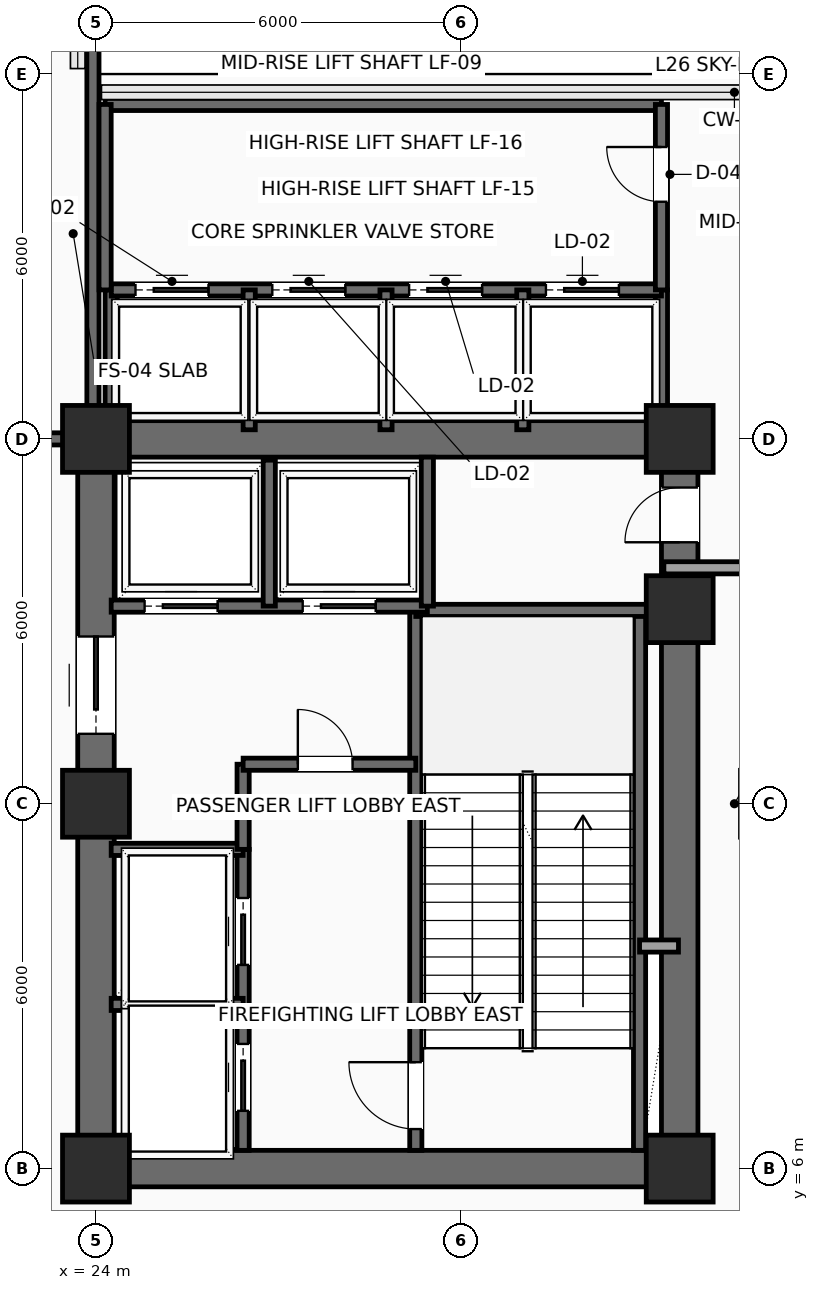
"""IFC4 building model, lengths in metres.
Left out: names, types, materials, properties, quantities, classifications, styles, units other than length and angle.
Written with IfcOpenShell. Run it as: python <this file> out.ifc"""

import sys

from ifc_helpers import new_model, si_unit, direction, frame, frame_2d, origin, origin_2d, place, context, subcontext, project, spatial, rectangle, extrude, element, fill, save


model = new_model("IFC4")
c1 = context("Model", 3, precision=1e-05, world=origin(), true_north=direction((0.0, 1.0)))
c2 = subcontext(c1, "Body", "Model", "MODEL_VIEW")
j1 = project(units=[si_unit("LENGTHUNIT", "METRE"), si_unit("PLANEANGLEUNIT", "RADIAN")], contexts=[c1])
p1 = place(None, origin())
s1 = spatial("IfcSite", under=j1, at=p1, CompositionType="ELEMENT")
p2 = place(p1, origin())
s2 = spatial("IfcBuilding", under=s1, at=p2, CompositionType="ELEMENT")
p3 = place(p2, frame((0.0, 0.0, 110.85)))
s3 = spatial("IfcBuildingStorey", under=s2, at=p3, CompositionType="ELEMENT", Elevation=110.85)
for number, where, z_axis, x_axis in (
    (1, (24.0, 6.0, 0.0), (0.0, 0.0, 1.0), (1.0, 0.0, 0.0)),
    (2, (24.0, 12.0, 0.0), (0.0, 0.0, 1.0), (1.0, 0.0, 0.0)),
    (3, (24.0, 18.0, 0.0), (0.0, 0.0, 1.0), (1.0, 0.0, 0.0)),
    (4, (33.6, 6.0, 0.0), (0.0, 0.0, 1.0), (1.0, 0.0, 0.0)),
    (5, (33.6, 15.2, 0.0), (0.0, 0.0, 1.0), (1.0, 0.0, 0.0)),
    (6, (33.6, 18.0, 0.0), (0.0, 0.0, 1.0), (1.0, 0.0, 0.0)),
):
    element("IfcColumn", number, at=place(p3, frame(where, z_axis=z_axis, x_axis=x_axis)), inside=s3, PredefinedType="COLUMN", context=c2, shape_type="SweptSolid", body=[
        extrude(rectangle(XDim=1.1, YDim=1.1, at=origin_2d()), origin(), (0.0, 0.0, 1.0), 4.8),
    ])
for number, where, z_axis, x_axis in (
    (7, (24.0, 6.0, 0.0), (0.0, 0.0, 1.0), (1.0, 0.0, 0.0)),
    (8, (24.0, 18.0, 0.0), (0.0, 0.0, 1.0), (1.0, 0.0, 0.0)),
):
    element("IfcWall", number, at=place(p3, frame(where, z_axis=z_axis, x_axis=x_axis)), inside=s3, PredefinedType="SHEAR", context=c2, shape_type="SweptSolid", body=[
        extrude(rectangle(XDim=9.6, YDim=0.6, at=frame_2d((4.8, 0.0))), origin(), (0.0, 0.0, 1.0), 4.575),
    ])
p4 = place(p3, frame((24.0, 6.0, 0.0), z_axis=(0.0, 0.0, 1.0), x_axis=(0.0, 1.0, 0.0)))
e9 = element("IfcWall", 9, at=p4, inside=s3, PredefinedType="SHEAR", context=c2, shape_type="SweptSolid", body=[
    extrude(rectangle(XDim=12.0, YDim=0.6, at=frame_2d((6.0, 0.0))), origin(), (0.0, 0.0, 1.0), 4.575),
])
p5 = place(p4, frame((7.15, 0.0, 0.0)))
e10 = element("IfcOpeningElement", 10, at=p5, cuts=e9, PredefinedType="OPENING", context=c2, shape_type="SweptSolid", body=[
    extrude(rectangle(XDim=1.6, YDim=2.3, at=frame_2d((0.8, 1.15))), frame((0.0, 0.31, 0.0), z_axis=(0.0, -1.0, 0.0), x_axis=(1.0, 0.0, 0.0)), (0.0, 0.0, 1.0), 0.62),
])
p6 = place(p3, frame((33.6, 6.0, 0.0), z_axis=(0.0, 0.0, 1.0), x_axis=(0.0, 1.0, 0.0)))
e11 = element("IfcWall", 11, at=p6, inside=s3, PredefinedType="SHEAR", context=c2, shape_type="SweptSolid", body=[
    extrude(rectangle(XDim=12.0, YDim=0.6, at=frame_2d((6.0, 0.0))), origin(), (0.0, 0.0, 1.0), 4.575),
])
p7 = place(p6, frame((10.3, 0.0, 0.0)))
e12 = element("IfcOpeningElement", 12, at=p7, cuts=e11, PredefinedType="OPENING", context=c2, shape_type="SweptSolid", body=[
    extrude(rectangle(XDim=0.9, YDim=2.15, at=frame_2d((0.45, 1.075))), frame((0.0, 0.31, 0.0), z_axis=(0.0, -1.0, 0.0), x_axis=(1.0, 0.0, 0.0)), (0.0, 0.0, 1.0), 0.62),
])
p8 = place(p3, frame((29.26, 6.3, 0.0), z_axis=(0.0, 0.0, 1.0), x_axis=(0.0, 1.0, 0.0)))
e13 = element("IfcWall", 13, at=p8, inside=s3, PredefinedType="SHEAR", context=c2, shape_type="SweptSolid", body=[
    extrude(rectangle(XDim=8.88, YDim=0.2, at=frame_2d((4.44, 0.0))), origin(), (0.0, 0.0, 1.0), 4.575),
])
p9 = place(p8, frame((0.35, 0.0, 0.0)))
e14 = element("IfcOpeningElement", 14, at=p9, cuts=e13, PredefinedType="OPENING", context=c2, shape_type="SweptSolid", body=[
    extrude(rectangle(XDim=1.1, YDim=2.2, at=frame_2d((0.55, 1.1))), frame((0.0, 0.11, 0.0), z_axis=(0.0, -1.0, 0.0), x_axis=(1.0, 0.0, 0.0)), (0.0, 0.0, 1.0), 0.22),
])
p10 = place(p3, frame((32.94, 6.3, 0.0), z_axis=(0.0, 0.0, 1.0), x_axis=(0.0, 1.0, 0.0)))
e15 = element("IfcWall", 15, at=p10, inside=s3, PredefinedType="SHEAR", context=c2, shape_type="SweptSolid", body=[
    extrude(rectangle(XDim=8.88, YDim=0.2, at=frame_2d((4.44, 0.0))), origin(), (0.0, 0.0, 1.0), 4.575),
])
p11 = place(p3, frame((29.26, 15.18, 0.0), z_axis=(0.0, 0.0, 1.0), x_axis=(1.0, 0.0, 0.0)))
e16 = element("IfcWall", 16, at=p11, inside=s3, PredefinedType="SHEAR", context=c2, shape_type="SweptSolid", body=[
    extrude(rectangle(XDim=4.04, YDim=0.2, at=frame_2d((2.02, 0.0))), origin(), (0.0, 0.0, 1.0), 4.575),
])
p12 = place(p3, frame((26.42, 6.3, 0.0), z_axis=(0.0, 0.0, 1.0), x_axis=(0.0, 1.0, 0.0)))
e17 = element("IfcWall", 17, at=p12, inside=s3, PredefinedType="SHEAR", context=c2, shape_type="SweptSolid", body=[
    extrude(rectangle(XDim=4.95, YDim=0.2, at=frame_2d((2.475, 0.0))), origin(), (0.0, 0.0, 1.0), 4.575),
])
p13 = place(p12, frame((0.65, 0.0, 0.0)))
e18 = element("IfcOpeningElement", 18, at=p13, cuts=e17, PredefinedType="OPENING", context=c2, shape_type="SweptSolid", body=[
    extrude(rectangle(XDim=1.1, YDim=2.2, at=frame_2d((0.55, 1.1))), frame((0.0, 0.11, 0.0), z_axis=(0.0, -1.0, 0.0), x_axis=(1.0, 0.0, 0.0)), (0.0, 0.0, 1.0), 0.22),
])
p14 = place(p12, frame((3.05, 0.0, 0.0)))
e19 = element("IfcOpeningElement", 19, at=p14, cuts=e17, PredefinedType="OPENING", context=c2, shape_type="SweptSolid", body=[
    extrude(rectangle(XDim=1.1, YDim=2.2, at=frame_2d((0.55, 1.1))), frame((0.0, 0.11, 0.0), z_axis=(0.0, -1.0, 0.0), x_axis=(1.0, 0.0, 0.0)), (0.0, 0.0, 1.0), 0.22),
])
for number, where, z_axis, x_axis in (
    (20, (24.25, 8.7, 0.0), (0.0, 0.0, 1.0), (1.0, 0.0, 0.0)),
    (21, (24.25, 11.25, 0.0), (0.0, 0.0, 1.0), (1.0, 0.0, 0.0)),
):
    element("IfcWall", number, at=place(p3, frame(where, z_axis=z_axis, x_axis=x_axis)), inside=s3, PredefinedType="SHEAR", context=c2, shape_type="SweptSolid", body=[
        extrude(rectangle(XDim=2.17, YDim=0.2, at=frame_2d((1.085, 0.0))), origin(), (0.0, 0.0, 1.0), 4.575),
    ])
p15 = place(p3, frame((26.42, 11.25, 0.0), z_axis=(0.0, 0.0, 1.0), x_axis=(0.0, 1.0, 0.0)))
e22 = element("IfcWall", 22, at=p15, inside=s3, PredefinedType="SHEAR", context=c2, shape_type="SweptSolid", body=[
    extrude(rectangle(XDim=1.4, YDim=0.2, at=frame_2d((0.7, 0.0))), origin(), (0.0, 0.0, 1.0), 4.575),
])
p16 = place(p3, frame((26.42, 12.65, 0.0), z_axis=(0.0, 0.0, 1.0), x_axis=(1.0, 0.0, 0.0)))
e23 = element("IfcWall", 23, at=p16, inside=s3, PredefinedType="SHEAR", context=c2, shape_type="SweptSolid", body=[
    extrude(rectangle(XDim=2.84, YDim=0.2, at=frame_2d((1.42, 0.0))), origin(), (0.0, 0.0, 1.0), 4.575),
])
p17 = place(p16, frame((0.9, 0.0, 0.0)))
e24 = element("IfcOpeningElement", 24, at=p17, cuts=e23, PredefinedType="OPENING", context=c2, shape_type="SweptSolid", body=[
    extrude(rectangle(XDim=0.9, YDim=2.15, at=frame_2d((0.45, 1.075))), frame((0.0, 0.11, 0.0), z_axis=(0.0, -1.0, 0.0), x_axis=(1.0, 0.0, 0.0)), (0.0, 0.0, 1.0), 0.22),
])
p18 = place(p3, frame((32.94, 9.66, 0.0), z_axis=(0.0, 0.0, 1.0), x_axis=(1.0, 0.0, 0.0)))
e25 = element("IfcWall", 25, at=p18, inside=s3, PredefinedType="SOLIDWALL", context=c2, shape_type="SweptSolid", body=[
    extrude(rectangle(XDim=0.64, YDim=0.2, at=frame_2d((0.32, 0.0))), origin(), (0.0, 0.0, 1.0), 4.575),
])
p19 = place(p3, frame((24.25, 15.25, 0.0), z_axis=(0.0, 0.0, 1.0), x_axis=(1.0, 0.0, 0.0)))
e26 = element("IfcWall", 26, at=p19, inside=s3, PredefinedType="SHEAR", context=c2, shape_type="SweptSolid", body=[
    extrude(rectangle(XDim=5.2, YDim=0.2, at=frame_2d((2.6, 0.0))), origin(), (0.0, 0.0, 1.0), 4.575),
])
p20 = place(p19, frame((0.55, 0.0, 0.0)))
e27 = element("IfcOpeningElement", 27, at=p20, cuts=e26, PredefinedType="OPENING", context=c2, shape_type="SweptSolid", body=[
    extrude(rectangle(XDim=1.2, YDim=2.2, at=frame_2d((0.6, 1.1))), frame((0.0, 0.11, 0.0), z_axis=(0.0, -1.0, 0.0), x_axis=(1.0, 0.0, 0.0)), (0.0, 0.0, 1.0), 0.22),
])
p21 = place(p19, frame((3.15, 0.0, 0.0)))
e28 = element("IfcOpeningElement", 28, at=p21, cuts=e26, PredefinedType="OPENING", context=c2, shape_type="SweptSolid", body=[
    extrude(rectangle(XDim=1.2, YDim=2.2, at=frame_2d((0.6, 1.1))), frame((0.0, 0.11, 0.0), z_axis=(0.0, -1.0, 0.0), x_axis=(1.0, 0.0, 0.0)), (0.0, 0.0, 1.0), 0.22),
])
p22 = place(p3, frame((26.85, 15.25, 0.0), z_axis=(0.0, 0.0, 1.0), x_axis=(0.0, 1.0, 0.0)))
e29 = element("IfcWall", 29, at=p22, inside=s3, PredefinedType="SHEAR", context=c2, shape_type="SweptSolid", body=[
    extrude(rectangle(XDim=2.4, YDim=0.2, at=frame_2d((1.2, 0.0))), origin(), (0.0, 0.0, 1.0), 4.575),
])
p23 = place(p3, frame((29.45, 15.25, 0.0), z_axis=(0.0, 0.0, 1.0), x_axis=(0.0, 1.0, 0.0)))
e30 = element("IfcWall", 30, at=p23, inside=s3, PredefinedType="SHEAR", context=c2, shape_type="SweptSolid", body=[
    extrude(rectangle(XDim=2.45, YDim=0.2, at=frame_2d((1.225, 0.0))), origin(), (0.0, 0.0, 1.0), 4.575),
])
p24 = place(p3, frame((20.45, 18.0, 0.0), z_axis=(0.0, 0.0, 1.0), x_axis=(1.0, 0.0, 0.0)))
e31 = element("IfcWall", 31, at=p24, inside=s3, PredefinedType="SHEAR", context=c2, shape_type="SweptSolid", body=[
    extrude(rectangle(XDim=3.5, YDim=0.2, at=frame_2d((1.75, 0.0))), origin(), (0.0, 0.0, 1.0), 4.575),
])
p25 = place(p24, frame((0.95, 0.0, 0.0)))
e32 = element("IfcOpeningElement", 32, at=p25, cuts=e31, PredefinedType="OPENING", context=c2, shape_type="SweptSolid", body=[
    extrude(rectangle(XDim=1.6, YDim=2.3, at=frame_2d((0.8, 1.15))), frame((0.0, 0.11, 0.0), z_axis=(0.0, -1.0, 0.0), x_axis=(1.0, 0.0, 0.0)), (0.0, 0.0, 1.0), 0.22),
])
p26 = place(p3, frame((23.95, 18.0, 0.0), z_axis=(0.0, 0.0, 1.0), x_axis=(0.0, 1.0, 0.0)))
e33 = element("IfcWall", 33, at=p26, inside=s3, PredefinedType="SHEAR", context=c2, shape_type="SweptSolid", body=[
    extrude(rectangle(XDim=9.3, YDim=0.2, at=frame_2d((4.65, 0.0))), origin(), (0.0, 0.0, 1.0), 4.575),
])
for number, where, z_axis, x_axis in (
    (34, (33.3, 18.1, 0.0), (0.0, 0.0, 1.0), (0.0, 1.0, 0.0)),
    (35, (24.25, 18.1, 0.0), (0.0, 0.0, 1.0), (0.0, 1.0, 0.0)),
):
    element("IfcWall", number, at=place(p3, frame(where, z_axis=z_axis, x_axis=x_axis)), inside=s3, PredefinedType="SHEAR", context=c2, shape_type="SweptSolid", body=[
        extrude(rectangle(XDim=2.35, YDim=0.2, at=frame_2d((1.175, 0.0))), origin(), (0.0, 0.0, 1.0), 4.575),
    ])
p27 = place(p3, frame((24.25, 20.45, 0.0), z_axis=(0.0, 0.0, 1.0), x_axis=(1.0, 0.0, 0.0)))
e36 = element("IfcWall", 36, at=p27, inside=s3, PredefinedType="SHEAR", context=c2, shape_type="SweptSolid", body=[
    extrude(rectangle(XDim=9.05, YDim=0.2, at=frame_2d((4.525, 0.0))), origin(), (0.0, 0.0, 1.0), 4.575),
])
p28 = place(p27, frame((0.4, 0.0, 0.0)))
e37 = element("IfcOpeningElement", 37, at=p28, cuts=e36, PredefinedType="OPENING", context=c2, shape_type="SweptSolid", body=[
    extrude(rectangle(XDim=1.2, YDim=2.2, at=frame_2d((0.6, 1.1))), frame((0.0, 0.11, 0.0), z_axis=(0.0, -1.0, 0.0), x_axis=(1.0, 0.0, 0.0)), (0.0, 0.0, 1.0), 0.22),
])
p29 = place(p27, frame((2.65, 0.0, 0.0)))
e38 = element("IfcOpeningElement", 38, at=p29, cuts=e36, PredefinedType="OPENING", context=c2, shape_type="SweptSolid", body=[
    extrude(rectangle(XDim=1.2, YDim=2.2, at=frame_2d((0.6, 1.1))), frame((0.0, 0.11, 0.0), z_axis=(0.0, -1.0, 0.0), x_axis=(1.0, 0.0, 0.0)), (0.0, 0.0, 1.0), 0.22),
])
p30 = place(p27, frame((4.9, 0.0, 0.0)))
e39 = element("IfcOpeningElement", 39, at=p30, cuts=e36, PredefinedType="OPENING", context=c2, shape_type="SweptSolid", body=[
    extrude(rectangle(XDim=1.2, YDim=2.2, at=frame_2d((0.6, 1.1))), frame((0.0, 0.11, 0.0), z_axis=(0.0, -1.0, 0.0), x_axis=(1.0, 0.0, 0.0)), (0.0, 0.0, 1.0), 0.22),
])
p31 = place(p27, frame((7.15, 0.0, 0.0)))
e40 = element("IfcOpeningElement", 40, at=p31, cuts=e36, PredefinedType="OPENING", context=c2, shape_type="SweptSolid", body=[
    extrude(rectangle(XDim=1.2, YDim=2.2, at=frame_2d((0.6, 1.1))), frame((0.0, 0.11, 0.0), z_axis=(0.0, -1.0, 0.0), x_axis=(1.0, 0.0, 0.0)), (0.0, 0.0, 1.0), 0.22),
])
for number, where, z_axis, x_axis in (
    (41, (26.52, 18.15, 0.0), (0.0, 0.0, 1.0), (0.0, 1.0, 0.0)),
    (42, (28.77, 18.15, 0.0), (0.0, 0.0, 1.0), (0.0, 1.0, 0.0)),
    (43, (31.02, 18.15, 0.0), (0.0, 0.0, 1.0), (0.0, 1.0, 0.0)),
):
    element("IfcWall", number, at=place(p3, frame(where, z_axis=z_axis, x_axis=x_axis)), inside=s3, PredefinedType="SHEAR", context=c2, shape_type="SweptSolid", body=[
        extrude(rectangle(XDim=2.3, YDim=0.2, at=frame_2d((1.15, 0.0))), origin(), (0.0, 0.0, 1.0), 4.575),
    ])
p32 = place(p3, frame((24.15, 23.5, 0.0), z_axis=(0.0, 0.0, 1.0), x_axis=(1.0, 0.0, 0.0)))
e44 = element("IfcWall", 44, at=p32, inside=s3, PredefinedType="SHEAR", context=c2, shape_type="SweptSolid", body=[
    extrude(rectangle(XDim=9.15, YDim=0.2, at=frame_2d((4.575, 0.0))), origin(), (0.0, 0.0, 1.0), 4.575),
])
p33 = place(p3, frame((33.3, 20.45, 0.0), z_axis=(0.0, 0.0, 1.0), x_axis=(0.0, 1.0, 0.0)))
e45 = element("IfcWall", 45, at=p33, inside=s3, PredefinedType="SHEAR", context=c2, shape_type="SweptSolid", body=[
    extrude(rectangle(XDim=3.05, YDim=0.2, at=frame_2d((1.525, 0.0))), origin(), (0.0, 0.0, 1.0), 4.575),
])
p34 = place(p33, frame((1.45, 0.0, 0.0)))
e46 = element("IfcOpeningElement", 46, at=p34, cuts=e45, PredefinedType="OPENING", context=c2, shape_type="SweptSolid", body=[
    extrude(rectangle(XDim=0.9, YDim=2.15, at=frame_2d((0.45, 1.075))), frame((0.0, 0.11, 0.0), z_axis=(0.0, -1.0, 0.0), x_axis=(1.0, 0.0, 0.0)), (0.0, 0.0, 1.0), 0.22),
])
p35 = place(p3, frame((24.15, 20.45, 0.0), z_axis=(0.0, 0.0, 1.0), x_axis=(0.0, 1.0, 0.0)))
e47 = element("IfcWall", 47, at=p35, inside=s3, PredefinedType="SHEAR", context=c2, shape_type="SweptSolid", body=[
    extrude(rectangle(XDim=3.05, YDim=0.2, at=frame_2d((1.525, 0.0))), origin(), (0.0, 0.0, 1.0), 4.575),
])
p36 = place(p3, frame((36.15, 15.88, 0.0), z_axis=(0.0, 0.0, 1.0), x_axis=(-1.0, 0.0, 0.0)))
e48 = element("IfcWall", 48, at=p36, inside=s3, PredefinedType="PARTITIONING", context=c2, shape_type="SweptSolid", body=[
    extrude(rectangle(XDim=2.81, YDim=0.2, at=frame_2d((1.405, 0.0))), origin(), (0.0, 0.0, 1.0), 4.575),
])
p37 = place(p5, origin())
e49 = element("IfcDoor", 49, at=p37, inside=s3, OperationType="DOUBLE_DOOR_SLIDING", PredefinedType="DOOR", context=c2, shape_type="SweptSolid", body=[
    extrude(rectangle(XDim=1.6, YDim=2.3, at=frame_2d((0.8, 1.15))), frame((0.0, 0.025, 0.0), z_axis=(0.0, -1.0, 0.0), x_axis=(1.0, 0.0, 0.0)), (0.0, 0.0, 1.0), 0.05),
])
fill(e10, e49)
p38 = place(p7, origin())
e50 = element("IfcDoor", 50, at=p38, inside=s3, OperationType="SINGLE_SWING_LEFT", PredefinedType="DOOR", context=c2, shape_type="SweptSolid", body=[
    extrude(rectangle(XDim=0.9, YDim=2.15, at=frame_2d((0.45, 1.075))), frame((0.0, 0.025, 0.0), z_axis=(0.0, -1.0, 0.0), x_axis=(1.0, 0.0, 0.0)), (0.0, 0.0, 1.0), 0.05),
])
fill(e12, e50)
p39 = place(p9, origin())
e51 = element("IfcDoor", 51, at=p39, inside=s3, OperationType="SINGLE_SWING_RIGHT", PredefinedType="DOOR", context=c2, shape_type="SweptSolid", body=[
    extrude(rectangle(XDim=1.1, YDim=2.2, at=frame_2d((0.55, 1.1))), frame((0.0, 0.025, 0.0), z_axis=(0.0, -1.0, 0.0), x_axis=(1.0, 0.0, 0.0)), (0.0, 0.0, 1.0), 0.05),
])
fill(e14, e51)
p40 = place(p13, origin())
e52 = element("IfcDoor", 52, at=p40, inside=s3, OperationType="SLIDING_TO_LEFT", PredefinedType="DOOR", context=c2, shape_type="SweptSolid", body=[
    extrude(rectangle(XDim=1.1, YDim=2.2, at=frame_2d((0.55, 1.1))), frame((0.0, 0.025, 0.0), z_axis=(0.0, -1.0, 0.0), x_axis=(1.0, 0.0, 0.0)), (0.0, 0.0, 1.0), 0.05),
])
fill(e18, e52)
p41 = place(p14, origin())
e53 = element("IfcDoor", 53, at=p41, inside=s3, OperationType="SLIDING_TO_LEFT", PredefinedType="DOOR", context=c2, shape_type="SweptSolid", body=[
    extrude(rectangle(XDim=1.1, YDim=2.2, at=frame_2d((0.55, 1.1))), frame((0.0, 0.025, 0.0), z_axis=(0.0, -1.0, 0.0), x_axis=(1.0, 0.0, 0.0)), (0.0, 0.0, 1.0), 0.05),
])
fill(e19, e53)
p42 = place(p17, origin())
e54 = element("IfcDoor", 54, at=p42, inside=s3, OperationType="SINGLE_SWING_LEFT", PredefinedType="DOOR", context=c2, shape_type="SweptSolid", body=[
    extrude(rectangle(XDim=0.9, YDim=2.15, at=frame_2d((0.45, 1.075))), frame((0.0, 0.025, 0.0), z_axis=(0.0, -1.0, 0.0), x_axis=(1.0, 0.0, 0.0)), (0.0, 0.0, 1.0), 0.05),
])
fill(e24, e54)
p43 = place(p20, origin())
e55 = element("IfcDoor", 55, at=p43, inside=s3, OperationType="SLIDING_TO_RIGHT", PredefinedType="DOOR", context=c2, shape_type="SweptSolid", body=[
    extrude(rectangle(XDim=1.2, YDim=2.2, at=frame_2d((0.6, 1.1))), frame((0.0, 0.025, 0.0), z_axis=(0.0, -1.0, 0.0), x_axis=(1.0, 0.0, 0.0)), (0.0, 0.0, 1.0), 0.05),
])
fill(e27, e55)
p44 = place(p21, origin())
e56 = element("IfcDoor", 56, at=p44, inside=s3, OperationType="SLIDING_TO_RIGHT", PredefinedType="DOOR", context=c2, shape_type="SweptSolid", body=[
    extrude(rectangle(XDim=1.2, YDim=2.2, at=frame_2d((0.6, 1.1))), frame((0.0, 0.025, 0.0), z_axis=(0.0, -1.0, 0.0), x_axis=(1.0, 0.0, 0.0)), (0.0, 0.0, 1.0), 0.05),
])
fill(e28, e56)
p45 = place(p28, origin())
e57 = element("IfcDoor", 57, at=p45, inside=s3, OperationType="SLIDING_TO_RIGHT", PredefinedType="DOOR", context=c2, shape_type="SweptSolid", body=[
    extrude(rectangle(XDim=1.2, YDim=2.2, at=frame_2d((0.6, 1.1))), frame((0.0, 0.025, 0.0), z_axis=(0.0, -1.0, 0.0), x_axis=(1.0, 0.0, 0.0)), (0.0, 0.0, 1.0), 0.05),
])
fill(e37, e57)
p46 = place(p29, origin())
e58 = element("IfcDoor", 58, at=p46, inside=s3, OperationType="SLIDING_TO_RIGHT", PredefinedType="DOOR", context=c2, shape_type="SweptSolid", body=[
    extrude(rectangle(XDim=1.2, YDim=2.2, at=frame_2d((0.6, 1.1))), frame((0.0, 0.025, 0.0), z_axis=(0.0, -1.0, 0.0), x_axis=(1.0, 0.0, 0.0)), (0.0, 0.0, 1.0), 0.05),
])
fill(e38, e58)
p47 = place(p30, origin())
e59 = element("IfcDoor", 59, at=p47, inside=s3, OperationType="SLIDING_TO_RIGHT", PredefinedType="DOOR", context=c2, shape_type="SweptSolid", body=[
    extrude(rectangle(XDim=1.2, YDim=2.2, at=frame_2d((0.6, 1.1))), frame((0.0, 0.025, 0.0), z_axis=(0.0, -1.0, 0.0), x_axis=(1.0, 0.0, 0.0)), (0.0, 0.0, 1.0), 0.05),
])
fill(e39, e59)
p48 = place(p31, origin())
e60 = element("IfcDoor", 60, at=p48, inside=s3, OperationType="SLIDING_TO_RIGHT", PredefinedType="DOOR", context=c2, shape_type="SweptSolid", body=[
    extrude(rectangle(XDim=1.2, YDim=2.2, at=frame_2d((0.6, 1.1))), frame((0.0, 0.025, 0.0), z_axis=(0.0, -1.0, 0.0), x_axis=(1.0, 0.0, 0.0)), (0.0, 0.0, 1.0), 0.05),
])
fill(e40, e60)
p49 = place(p34, origin())
e61 = element("IfcDoor", 61, at=p49, inside=s3, OperationType="SINGLE_SWING_RIGHT", PredefinedType="DOOR", context=c2, shape_type="SweptSolid", body=[
    extrude(rectangle(XDim=0.9, YDim=2.15, at=frame_2d((0.45, 1.075))), frame((0.0, 0.025, 0.0), z_axis=(0.0, -1.0, 0.0), x_axis=(1.0, 0.0, 0.0)), (0.0, 0.0, 1.0), 0.05),
])
fill(e46, e61)
save(model, sys.argv[1])
